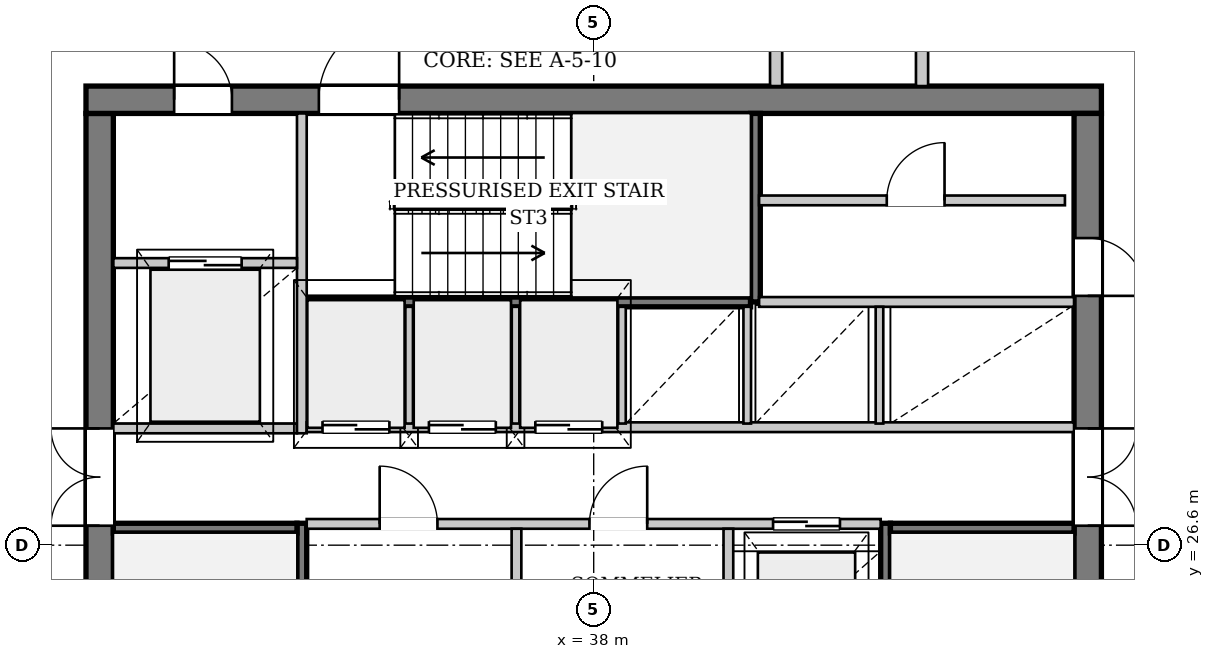
"""IFC4 building model, lengths in metres.
Left out: names, types, materials, properties, quantities, classifications, styles, units other than length and angle.
Written with IfcOpenShell. Run it as: python <this file> out.ifc"""

import sys

from ifc_helpers import new_model, si_unit, direction, frame, frame_2d, origin, place, context, subcontext, project, spatial, rectangle, extrude, source, transform, mapped, element, fill, save


model = new_model("IFC4")
c1 = context("Model", 3, precision=1e-05, world=origin(), true_north=direction((0.0, 1.0)))
c2 = subcontext(c1, "Body", "Model", "MODEL_VIEW")
j1 = project(units=[si_unit("LENGTHUNIT", "METRE"), si_unit("PLANEANGLEUNIT", "RADIAN")], contexts=[c1])
p1 = place(None, origin())
s1 = spatial("IfcSite", under=j1, at=p1, CompositionType="ELEMENT")
p2 = place(p1, origin())
s2 = spatial("IfcBuilding", under=s1, at=p2, CompositionType="ELEMENT")
p3 = place(p2, frame((0.0, 0.0, 263.3)))
s3 = spatial("IfcBuildingStorey", under=s2, at=p3, CompositionType="ELEMENT", Elevation=263.3)
p4 = place(p3, frame((51.577, 26.839, 0.0), z_axis=(0.0, 0.0, 1.0), x_axis=(-0.252928525252, -0.967484966867, 0.0)))
e1 = element("IfcWall", 1, at=p4, inside=s3, PredefinedType="SOLIDWALL", context=c2, shape_type="SweptSolid", body=[
    extrude(rectangle(XDim=22.323, YDim=0.32, at=frame_2d((11.161, 0.0))), origin(), (0.0, 0.0, 1.0), 2.872),
])
p5 = place(p4, frame((6.393, 0.0, 0.0)))
e2 = element("IfcOpeningElement", 2, at=p5, cuts=e1, PredefinedType="OPENING", context=c2, shape_type="SweptSolid", body=[
    extrude(rectangle(XDim=1.5, YDim=2.3, at=frame_2d((0.75, 1.15))), frame((0.0, 0.17, 0.0), z_axis=(0.0, -1.0, 0.0), x_axis=(1.0, 0.0, 0.0)), (0.0, 0.0, 1.0), 0.34),
])
p6 = place(p4, frame((15.219, 0.0, 0.402)))
e3 = element("IfcOpeningElement", 3, at=p6, cuts=e1, PredefinedType="OPENING", context=c2, shape_type="SweptSolid", body=[
    extrude(rectangle(XDim=2.6, YDim=2.35, at=frame_2d((1.3, 1.175))), frame((0.0, 0.17, 0.0), z_axis=(0.0, -1.0, 0.0), x_axis=(1.0, 0.0, 0.0)), (0.0, 0.0, 1.0), 0.34),
])
p7 = place(p3, frame((15.894, 26.68, 0.0), z_axis=(0.0, 0.0, 1.0), x_axis=(0.802229105353, 0.59701630005, 0.0)))
e4 = element("IfcWall", 4, at=p7, inside=s3, PredefinedType="SOLIDWALL", context=c2, shape_type="SweptSolid", body=[
    extrude(rectangle(XDim=21.802, YDim=0.38, at=frame_2d((10.901, 0.0))), origin(), (0.0, 0.0, 1.0), 2.872),
])
p8 = place(p7, frame((7.105, 0.0, 0.65)))
e5 = element("IfcOpeningElement", 5, at=p8, cuts=e4, PredefinedType="OPENING", context=c2, shape_type="SweptSolid", body=[
    extrude(rectangle(XDim=1.2, YDim=1.5, at=frame_2d((0.6, 0.75))), frame((0.0, 0.2, 0.0), z_axis=(0.0, -1.0, 0.0), x_axis=(1.0, 0.0, 0.0)), (0.0, 0.0, 1.0), 0.4),
])
p9 = place(p7, frame((16.698, 0.0, 0.65)))
e6 = element("IfcOpeningElement", 6, at=p9, cuts=e4, PredefinedType="OPENING", context=c2, shape_type="SweptSolid", body=[
    extrude(rectangle(XDim=1.2, YDim=1.5, at=frame_2d((0.6, 0.75))), frame((0.0, 0.2, 0.0), z_axis=(0.0, -1.0, 0.0), x_axis=(1.0, 0.0, 0.0)), (0.0, 0.0, 1.0), 0.4),
])
p10 = place(p3, frame((29.875, 19.5, 0.0), z_axis=(0.0, 0.0, 1.0), x_axis=(0.0, 1.0, 0.0)))
e7 = element("IfcWall", 7, at=p10, inside=s3, PredefinedType="SHEAR", context=c2, shape_type="SweptSolid", body=[
    extrude(rectangle(XDim=14.2, YDim=0.45, at=frame_2d((7.1, 0.0))), origin(), (0.0, 0.0, 1.0), 3.38),
])
p11 = place(p10, frame((7.42, 0.0, 0.0)))
e8 = element("IfcOpeningElement", 8, at=p11, cuts=e7, PredefinedType="OPENING", context=c2, shape_type="SweptSolid", body=[
    extrude(rectangle(XDim=1.6, YDim=2.2, at=frame_2d((0.8, 1.1))), frame((0.0, 0.235, 0.0), z_axis=(0.0, -1.0, 0.0), x_axis=(1.0, 0.0, 0.0)), (0.0, 0.0, 1.0), 0.47),
])
p12 = place(p3, frame((29.65, 33.925, 0.0), z_axis=(0.0, 0.0, 1.0), x_axis=(1.0, 0.0, 0.0)))
e9 = element("IfcWall", 9, at=p12, inside=s3, PredefinedType="SHEAR", context=c2, shape_type="SweptSolid", body=[
    extrude(rectangle(XDim=16.7, YDim=0.45, at=frame_2d((8.35, 0.0))), origin(), (0.0, 0.0, 1.0), 3.38),
])
p13 = place(p12, frame((1.45, 0.0, 0.0)))
e10 = element("IfcOpeningElement", 10, at=p13, cuts=e9, PredefinedType="OPENING", context=c2, shape_type="SweptSolid", body=[
    extrude(rectangle(XDim=0.95, YDim=2.1, at=frame_2d((0.475, 1.05))), frame((0.0, 0.235, 0.0), z_axis=(0.0, -1.0, 0.0), x_axis=(1.0, 0.0, 0.0)), (0.0, 0.0, 1.0), 0.47),
])
p14 = place(p12, frame((3.83, 0.0, 0.0)))
e11 = element("IfcOpeningElement", 11, at=p14, cuts=e9, PredefinedType="OPENING", context=c2, shape_type="SweptSolid", body=[
    extrude(rectangle(XDim=1.32, YDim=2.2, at=frame_2d((0.66, 1.1))), frame((0.0, 0.235, 0.0), z_axis=(0.0, -1.0, 0.0), x_axis=(1.0, 0.0, 0.0)), (0.0, 0.0, 1.0), 0.47),
])
p15 = place(p3, frame((46.125, 33.7, 0.0), z_axis=(0.0, 0.0, 1.0), x_axis=(0.0, -1.0, 0.0)))
e12 = element("IfcWall", 12, at=p15, inside=s3, PredefinedType="SHEAR", context=c2, shape_type="SweptSolid", body=[
    extrude(rectangle(XDim=14.2, YDim=0.45, at=frame_2d((7.1, 0.0))), origin(), (0.0, 0.0, 1.0), 3.38),
])
p16 = place(p15, frame((5.18, 0.0, 0.0)))
e13 = element("IfcOpeningElement", 13, at=p16, cuts=e12, PredefinedType="OPENING", context=c2, shape_type="SweptSolid", body=[
    extrude(rectangle(XDim=1.6, YDim=2.2, at=frame_2d((0.8, 1.1))), frame((0.0, 0.235, 0.0), z_axis=(0.0, -1.0, 0.0), x_axis=(1.0, 0.0, 0.0)), (0.0, 0.0, 1.0), 0.47),
])
p17 = place(p15, frame((2.05, 0.0, 0.0)))
e14 = element("IfcOpeningElement", 14, at=p17, cuts=e12, PredefinedType="OPENING", context=c2, shape_type="SweptSolid", body=[
    extrude(rectangle(XDim=0.95, YDim=2.1, at=frame_2d((0.475, 1.05))), frame((0.0, 0.235, 0.0), z_axis=(0.0, -1.0, 0.0), x_axis=(1.0, 0.0, 0.0)), (0.0, 0.0, 1.0), 0.47),
])
p18 = place(p3, frame((33.2, 19.5, 0.0), z_axis=(0.0, 0.0, 1.0), x_axis=(0.0, 1.0, 0.0)))
e15 = element("IfcWall", 15, at=p18, inside=s3, PredefinedType="PARTITIONING", context=c2, shape_type="SweptSolid", body=[
    extrude(rectangle(XDim=7.46, YDim=0.16, at=frame_2d((3.73, 0.0))), origin(), (0.0, 0.0, 1.0), 3.38),
])
p19 = place(p18, frame((0.08, 0.0, 0.0)))
e16 = element("IfcOpeningElement", 16, at=p19, cuts=e15, PredefinedType="OPENING", context=c2, shape_type="SweptSolid", body=[
    extrude(rectangle(XDim=1.32, YDim=2.2, at=frame_2d((0.66, 1.1))), frame((0.0, 0.09, 0.0), z_axis=(0.0, -1.0, 0.0), x_axis=(1.0, 0.0, 0.0)), (0.0, 0.0, 1.0), 0.18),
])
p20 = place(p3, frame((30.1, 26.88, 0.0), z_axis=(0.0, 0.0, 1.0), x_axis=(1.0, 0.0, 0.0)))
e17 = element("IfcWall", 17, at=p20, inside=s3, PredefinedType="PARTITIONING", context=c2, shape_type="SweptSolid", body=[
    extrude(rectangle(XDim=3.02, YDim=0.16, at=frame_2d((1.51, 0.0))), origin(), (0.0, 0.0, 1.0), 3.38),
])
p21 = place(p3, frame((42.8, 26.96, 0.0), z_axis=(0.0, 0.0, 1.0), x_axis=(0.0, -1.0, 0.0)))
e18 = element("IfcWall", 18, at=p21, inside=s3, PredefinedType="PARTITIONING", context=c2, shape_type="SweptSolid", body=[
    extrude(rectangle(XDim=7.46, YDim=0.16, at=frame_2d((3.73, 0.0))), origin(), (0.0, 0.0, 1.0), 3.38),
])
p22 = place(p21, frame((6.06, 0.0, 0.0)))
e19 = element("IfcOpeningElement", 19, at=p22, cuts=e18, PredefinedType="OPENING", context=c2, shape_type="SweptSolid", body=[
    extrude(rectangle(XDim=1.32, YDim=2.2, at=frame_2d((0.66, 1.1))), frame((0.0, 0.09, 0.0), z_axis=(0.0, -1.0, 0.0), x_axis=(1.0, 0.0, 0.0)), (0.0, 0.0, 1.0), 0.18),
])
p23 = place(p3, frame((42.88, 26.88, 0.0), z_axis=(0.0, 0.0, 1.0), x_axis=(1.0, 0.0, 0.0)))
e20 = element("IfcWall", 20, at=p23, inside=s3, PredefinedType="PARTITIONING", context=c2, shape_type="SweptSolid", body=[
    extrude(rectangle(XDim=3.02, YDim=0.16, at=frame_2d((1.51, 0.0))), origin(), (0.0, 0.0, 1.0), 3.38),
])
p24 = place(p3, frame((33.28, 30.6, 0.0), z_axis=(0.0, 0.0, 1.0), x_axis=(1.0, 0.0, 0.0)))
e21 = element("IfcWall", 21, at=p24, inside=s3, PredefinedType="PARTITIONING", context=c2, shape_type="SweptSolid", body=[
    extrude(rectangle(XDim=7.3, YDim=0.16, at=frame_2d((3.65, 0.0))), origin(), (0.0, 0.0, 1.0), 3.38),
])
p25 = place(p3, frame((40.66, 30.6, 0.0), z_axis=(0.0, 0.0, 1.0), x_axis=(0.0, 1.0, 0.0)))
e22 = element("IfcWall", 22, at=p25, inside=s3, PredefinedType="PARTITIONING", context=c2, shape_type="SweptSolid", body=[
    extrude(rectangle(XDim=3.1, YDim=0.16, at=frame_2d((1.55, 0.0))), origin(), (0.0, 0.0, 1.0), 3.38),
])
p26 = place(p3, frame((30.1, 28.52, 0.0), z_axis=(0.0, 0.0, 1.0), x_axis=(1.0, 0.0, 0.0)))
e23 = element("IfcWall", 23, at=p26, inside=s3, PredefinedType="PARTITIONING", context=c2, shape_type="SweptSolid", body=[
    extrude(rectangle(XDim=3.02, YDim=0.16, at=frame_2d((1.51, 0.0))), origin(), (0.0, 0.0, 1.0), 3.38),
])
p27 = place(p3, frame((33.2, 28.44, 0.0), z_axis=(0.0, 0.0, 1.0), x_axis=(0.0, 1.0, 0.0)))
e24 = element("IfcWall", 24, at=p27, inside=s3, PredefinedType="PARTITIONING", context=c2, shape_type="SweptSolid", body=[
    extrude(rectangle(XDim=5.26, YDim=0.16, at=frame_2d((2.63, 0.0))), origin(), (0.0, 0.0, 1.0), 3.38),
])
p28 = place(p3, frame((30.1, 31.24, 0.0), z_axis=(0.0, 0.0, 1.0), x_axis=(1.0, 0.0, 0.0)))
e25 = element("IfcWall", 25, at=p28, inside=s3, PredefinedType="PARTITIONING", context=c2, shape_type="SweptSolid", body=[
    extrude(rectangle(XDim=3.02, YDim=0.16, at=frame_2d((1.51, 0.0))), origin(), (0.0, 0.0, 1.0), 3.38),
])
p29 = place(p28, frame((0.91, 0.0, 0.0)))
e26 = element("IfcOpeningElement", 26, at=p29, cuts=e25, PredefinedType="OPENING", context=c2, shape_type="SweptSolid", body=[
    extrude(rectangle(XDim=1.2, YDim=2.2, at=frame_2d((0.6, 1.1))), frame((0.0, 0.09, 0.0), z_axis=(0.0, -1.0, 0.0), x_axis=(1.0, 0.0, 0.0)), (0.0, 0.0, 1.0), 0.18),
])
p30 = place(p3, frame((33.28, 26.95, 0.0), z_axis=(0.0, 0.0, 1.0), x_axis=(1.0, 0.0, 0.0)))
e27 = element("IfcWall", 27, at=p30, inside=s3, PredefinedType="PARTITIONING", context=c2, shape_type="SweptSolid", body=[
    extrude(rectangle(XDim=9.44, YDim=0.16, at=frame_2d((4.72, 0.0))), origin(), (0.0, 0.0, 1.0), 3.38),
])
p31 = place(p30, frame((1.2, 0.0, 0.0)))
e28 = element("IfcOpeningElement", 28, at=p31, cuts=e27, PredefinedType="OPENING", context=c2, shape_type="SweptSolid", body=[
    extrude(rectangle(XDim=0.95, YDim=2.1, at=frame_2d((0.475, 1.05))), frame((0.0, 0.09, 0.0), z_axis=(0.0, -1.0, 0.0), x_axis=(1.0, 0.0, 0.0)), (0.0, 0.0, 1.0), 0.18),
])
p32 = place(p30, frame((4.65, 0.0, 0.0)))
e29 = element("IfcOpeningElement", 29, at=p32, cuts=e27, PredefinedType="OPENING", context=c2, shape_type="SweptSolid", body=[
    extrude(rectangle(XDim=0.95, YDim=2.1, at=frame_2d((0.475, 1.05))), frame((0.0, 0.09, 0.0), z_axis=(0.0, -1.0, 0.0), x_axis=(1.0, 0.0, 0.0)), (0.0, 0.0, 1.0), 0.18),
])
p33 = place(p30, frame((7.67, 0.0, 0.0)))
e30 = element("IfcOpeningElement", 30, at=p33, cuts=e27, PredefinedType="OPENING", context=c2, shape_type="SweptSolid", body=[
    extrude(rectangle(XDim=1.1, YDim=2.2, at=frame_2d((0.55, 1.1))), frame((0.0, 0.09, 0.0), z_axis=(0.0, -1.0, 0.0), x_axis=(1.0, 0.0, 0.0)), (0.0, 0.0, 1.0), 0.18),
])
for number, where, z_axis, x_axis in (
    (31, (36.73, 24.56, 0.0), (0.0, 0.0, 1.0), (0.0, 1.0, 0.0)),
    (32, (40.215, 24.56, 0.0), (0.0, 0.0, 1.0), (0.0, 1.0, 0.0)),
):
    element("IfcWall", number, at=place(p3, frame(where, z_axis=z_axis, x_axis=x_axis)), inside=s3, PredefinedType="PARTITIONING", context=c2, shape_type="SweptSolid", body=[
        extrude(rectangle(XDim=2.31, YDim=0.16, at=frame_2d((1.155, 0.0))), origin(), (0.0, 0.0, 1.0), 3.38),
    ])
p34 = place(p3, frame((33.28, 28.54, 0.0), z_axis=(0.0, 0.0, 1.0), x_axis=(1.0, 0.0, 0.0)))
e33 = element("IfcWall", 33, at=p34, inside=s3, PredefinedType="PARTITIONING", context=c2, shape_type="SweptSolid", body=[
    extrude(rectangle(XDim=12.62, YDim=0.16, at=frame_2d((6.31, 0.0))), origin(), (0.0, 0.0, 1.0), 3.38),
])
p35 = place(p34, frame((0.26, 0.0, 0.0)))
e34 = element("IfcOpeningElement", 34, at=p35, cuts=e33, PredefinedType="OPENING", context=c2, shape_type="SweptSolid", body=[
    extrude(rectangle(XDim=1.1, YDim=2.2, at=frame_2d((0.55, 1.1))), frame((0.0, 0.09, 0.0), z_axis=(0.0, -1.0, 0.0), x_axis=(1.0, 0.0, 0.0)), (0.0, 0.0, 1.0), 0.18),
])
p36 = place(p34, frame((2.01, 0.0, 0.0)))
e35 = element("IfcOpeningElement", 35, at=p36, cuts=e33, PredefinedType="OPENING", context=c2, shape_type="SweptSolid", body=[
    extrude(rectangle(XDim=1.1, YDim=2.2, at=frame_2d((0.55, 1.1))), frame((0.0, 0.09, 0.0), z_axis=(0.0, -1.0, 0.0), x_axis=(1.0, 0.0, 0.0)), (0.0, 0.0, 1.0), 0.18),
])
p37 = place(p34, frame((3.76, 0.0, 0.0)))
e36 = element("IfcOpeningElement", 36, at=p37, cuts=e33, PredefinedType="OPENING", context=c2, shape_type="SweptSolid", body=[
    extrude(rectangle(XDim=1.1, YDim=2.2, at=frame_2d((0.55, 1.1))), frame((0.0, 0.09, 0.0), z_axis=(0.0, -1.0, 0.0), x_axis=(1.0, 0.0, 0.0)), (0.0, 0.0, 1.0), 0.18),
])
p38 = place(p3, frame((40.72, 30.6, 0.0), z_axis=(0.0, 0.0, 1.0), x_axis=(1.0, 0.0, 0.0)))
e37 = element("IfcWall", 37, at=p38, inside=s3, PredefinedType="PARTITIONING", context=c2, shape_type="SweptSolid", body=[
    extrude(rectangle(XDim=5.18, YDim=0.16, at=frame_2d((2.59, 0.0))), origin(), (0.0, 0.0, 1.0), 3.38),
])
for number, where, z_axis, x_axis in (
    (38, (34.965, 28.6, 0.0), (0.0, 0.0, 1.0), (0.0, 1.0, 0.0)),
    (39, (36.715, 28.6, 0.0), (0.0, 0.0, 1.0), (0.0, 1.0, 0.0)),
    (40, (38.465, 28.6, 0.0), (0.0, 0.0, 1.0), (0.0, 1.0, 0.0)),
    (41, (40.525, 28.6, 0.0), (0.0, 0.0, 1.0), (0.0, 1.0, 0.0)),
    (42, (42.7, 28.6, 0.0), (0.0, 0.0, 1.0), (0.0, 1.0, 0.0)),
):
    element("IfcWall", number, at=place(p3, frame(where, z_axis=z_axis, x_axis=x_axis)), inside=s3, PredefinedType="PARTITIONING", context=c2, shape_type="SweptSolid", body=[
        extrude(rectangle(XDim=1.92, YDim=0.125, at=frame_2d((0.96, 0.0))), origin(), (0.0, 0.0, 1.0), 3.38),
    ])
p39 = place(p3, frame((40.72, 32.27, 0.0), z_axis=(0.0, 0.0, 1.0), x_axis=(1.0, 0.0, 0.0)))
e43 = element("IfcWall", 43, at=p39, inside=s3, PredefinedType="PARTITIONING", context=c2, shape_type="SweptSolid", body=[
    extrude(rectangle(XDim=5.03, YDim=0.16, at=frame_2d((2.515, 0.0))), origin(), (0.0, 0.0, 1.0), 3.38),
])
p40 = place(p39, frame((2.1, 0.0, 0.0)))
e44 = element("IfcOpeningElement", 44, at=p40, cuts=e43, PredefinedType="OPENING", context=c2, shape_type="SweptSolid", body=[
    extrude(rectangle(XDim=0.95, YDim=2.1, at=frame_2d((0.475, 1.05))), frame((0.0, 0.09, 0.0), z_axis=(0.0, -1.0, 0.0), x_axis=(1.0, 0.0, 0.0)), (0.0, 0.0, 1.0), 0.18),
])
p41 = place(p3, frame((41.0, 34.15, 0.0), z_axis=(0.0, 0.0, 1.0), x_axis=(0.0, 1.0, 0.0)))
e45 = element("IfcWall", 45, at=p41, inside=s3, PredefinedType="PARTITIONING", context=c2, shape_type="SweptSolid", body=[
    extrude(rectangle(XDim=1.85, YDim=0.2, at=frame_2d((0.925, 0.0))), origin(), (0.0, 0.0, 1.0), 3.38),
])
p42 = place(p3, frame((43.4, 34.15, 0.0), z_axis=(0.0, 0.0, 1.0), x_axis=(0.0, 1.0, 0.0)))
e46 = element("IfcWall", 46, at=p42, inside=s3, PredefinedType="PARTITIONING", context=c2, shape_type="SweptSolid", body=[
    extrude(rectangle(XDim=1.85, YDim=0.2, at=frame_2d((0.925, 0.0))), origin(), (0.0, 0.0, 1.0), 3.055),
])
m1 = source(origin(), c2, "Body", "SweptSolid", [
    extrude(rectangle(XDim=1.6, YDim=2.2, at=frame_2d((0.8, 1.1))), frame((0.0, 0.025, 0.0), z_axis=(0.0, -1.0, 0.0), x_axis=(1.0, 0.0, 0.0)), (0.0, 0.0, 1.0), 0.05),
])
p43 = place(p11, origin())
e47 = element("IfcDoor", 47, at=p43, inside=s3, OperationType="DOUBLE_DOOR_SINGLE_SWING", PredefinedType="DOOR", context=c2, shape_type="MappedRepresentation", body=[
    mapped(m1, transform((0.0, 0.0, 0.0), x_axis=(1.0, 0.0, 0.0), y_axis=(0.0, 1.0, 0.0), z_axis=(0.0, 0.0, 1.0), scale=1.0)),
])
fill(e8, e47)
m2 = source(origin(), c2, "Body", "SweptSolid", [
    extrude(rectangle(XDim=0.95, YDim=2.1, at=frame_2d((0.475, 1.05))), frame((0.0, 0.025, 0.0), z_axis=(0.0, -1.0, 0.0), x_axis=(1.0, 0.0, 0.0)), (0.0, 0.0, 1.0), 0.05),
])
p44 = place(p13, origin())
e48 = element("IfcDoor", 48, at=p44, inside=s3, OperationType="SINGLE_SWING_LEFT", PredefinedType="DOOR", context=c2, shape_type="MappedRepresentation", body=[
    mapped(m2, transform((0.0, 0.0, 0.0), x_axis=(1.0, 0.0, 0.0), y_axis=(0.0, 1.0, 0.0), z_axis=(0.0, 0.0, 1.0), scale=1.0)),
])
fill(e10, e48)
m3 = source(origin(), c2, "Body", "SweptSolid", [
    extrude(rectangle(XDim=1.32, YDim=2.2, at=frame_2d((0.66, 1.1))), frame((0.0, 0.025, 0.0), z_axis=(0.0, -1.0, 0.0), x_axis=(1.0, 0.0, 0.0)), (0.0, 0.0, 1.0), 0.05),
])
p45 = place(p14, origin())
e49 = element("IfcDoor", 49, at=p45, inside=s3, OperationType="SINGLE_SWING_RIGHT", PredefinedType="DOOR", context=c2, shape_type="MappedRepresentation", body=[
    mapped(m3, transform((0.0, 0.0, 0.0), x_axis=(1.0, 0.0, 0.0), y_axis=(0.0, 1.0, 0.0), z_axis=(0.0, 0.0, 1.0), scale=1.0)),
])
fill(e11, e49)
p46 = place(p16, origin())
e50 = element("IfcDoor", 50, at=p46, inside=s3, OperationType="DOUBLE_DOOR_SINGLE_SWING", PredefinedType="DOOR", context=c2, shape_type="MappedRepresentation", body=[
    mapped(m1, transform((0.0, 0.0, 0.0), x_axis=(1.0, 0.0, 0.0), y_axis=(0.0, 1.0, 0.0), z_axis=(0.0, 0.0, 1.0), scale=1.0)),
])
fill(e13, e50)
m4 = source(origin(), c2, "Body", "SweptSolid", [
    extrude(rectangle(XDim=1.2, YDim=2.2, at=frame_2d((0.6, 1.1))), frame((0.0, 0.025, 0.0), z_axis=(0.0, -1.0, 0.0), x_axis=(1.0, 0.0, 0.0)), (0.0, 0.0, 1.0), 0.05),
])
p47 = place(p29, origin())
e51 = element("IfcDoor", 51, at=p47, inside=s3, OperationType="DOUBLE_DOOR_SLIDING", PredefinedType="DOOR", context=c2, shape_type="MappedRepresentation", body=[
    mapped(m4, transform((0.0, 0.0, 0.0), x_axis=(1.0, 0.0, 0.0), y_axis=(0.0, 1.0, 0.0), z_axis=(0.0, 0.0, 1.0), scale=1.0)),
])
fill(e26, e51)
p48 = place(p31, origin())
e52 = element("IfcDoor", 52, at=p48, inside=s3, OperationType="SINGLE_SWING_LEFT", PredefinedType="DOOR", context=c2, shape_type="MappedRepresentation", body=[
    mapped(m2, transform((0.0, 0.0, 0.0), x_axis=(1.0, 0.0, 0.0), y_axis=(0.0, 1.0, 0.0), z_axis=(0.0, 0.0, 1.0), scale=1.0)),
])
fill(e28, e52)
p49 = place(p32, origin())
e53 = element("IfcDoor", 53, at=p49, inside=s3, OperationType="SINGLE_SWING_RIGHT", PredefinedType="DOOR", context=c2, shape_type="MappedRepresentation", body=[
    mapped(m2, transform((0.0, 0.0, 0.0), x_axis=(1.0, 0.0, 0.0), y_axis=(0.0, 1.0, 0.0), z_axis=(0.0, 0.0, 1.0), scale=1.0)),
])
fill(e29, e53)
m5 = source(origin(), c2, "Body", "SweptSolid", [
    extrude(rectangle(XDim=1.1, YDim=2.2, at=frame_2d((0.55, 1.1))), frame((0.0, 0.025, 0.0), z_axis=(0.0, -1.0, 0.0), x_axis=(1.0, 0.0, 0.0)), (0.0, 0.0, 1.0), 0.05),
])
p50 = place(p33, origin())
e54 = element("IfcDoor", 54, at=p50, inside=s3, OperationType="DOUBLE_DOOR_SLIDING", PredefinedType="DOOR", context=c2, shape_type="MappedRepresentation", body=[
    mapped(m5, transform((0.0, 0.0, 0.0), x_axis=(1.0, 0.0, 0.0), y_axis=(0.0, 1.0, 0.0), z_axis=(0.0, 0.0, 1.0), scale=1.0)),
])
fill(e30, e54)
p51 = place(p35, origin())
e55 = element("IfcDoor", 55, at=p51, inside=s3, OperationType="DOUBLE_DOOR_SLIDING", PredefinedType="DOOR", context=c2, shape_type="MappedRepresentation", body=[
    mapped(m5, transform((0.0, 0.0, 0.0), x_axis=(1.0, 0.0, 0.0), y_axis=(0.0, 1.0, 0.0), z_axis=(0.0, 0.0, 1.0), scale=1.0)),
])
fill(e34, e55)
p52 = place(p36, origin())
e56 = element("IfcDoor", 56, at=p52, inside=s3, OperationType="DOUBLE_DOOR_SLIDING", PredefinedType="DOOR", context=c2, shape_type="MappedRepresentation", body=[
    mapped(m5, transform((0.0, 0.0, 0.0), x_axis=(1.0, 0.0, 0.0), y_axis=(0.0, 1.0, 0.0), z_axis=(0.0, 0.0, 1.0), scale=1.0)),
])
fill(e35, e56)
p53 = place(p37, origin())
e57 = element("IfcDoor", 57, at=p53, inside=s3, OperationType="DOUBLE_DOOR_SLIDING", PredefinedType="DOOR", context=c2, shape_type="MappedRepresentation", body=[
    mapped(m5, transform((0.0, 0.0, 0.0), x_axis=(1.0, 0.0, 0.0), y_axis=(0.0, 1.0, 0.0), z_axis=(0.0, 0.0, 1.0), scale=1.0)),
])
fill(e36, e57)
p54 = place(p40, origin())
e58 = element("IfcDoor", 58, at=p54, inside=s3, OperationType="SINGLE_SWING_RIGHT", PredefinedType="DOOR", context=c2, shape_type="MappedRepresentation", body=[
    mapped(m2, transform((0.0, 0.0, 0.0), x_axis=(1.0, 0.0, 0.0), y_axis=(0.0, 1.0, 0.0), z_axis=(0.0, 0.0, 1.0), scale=1.0)),
])
fill(e44, e58)
p55 = place(p17, origin())
e59 = element("IfcDoor", 59, at=p55, inside=s3, OperationType="SINGLE_SWING_RIGHT", PredefinedType="DOOR", context=c2, shape_type="MappedRepresentation", body=[
    mapped(m2, transform((0.0, 0.0, 0.0), x_axis=(1.0, 0.0, 0.0), y_axis=(0.0, 1.0, 0.0), z_axis=(0.0, 0.0, 1.0), scale=1.0)),
])
fill(e14, e59)
save(model, sys.argv[1])
